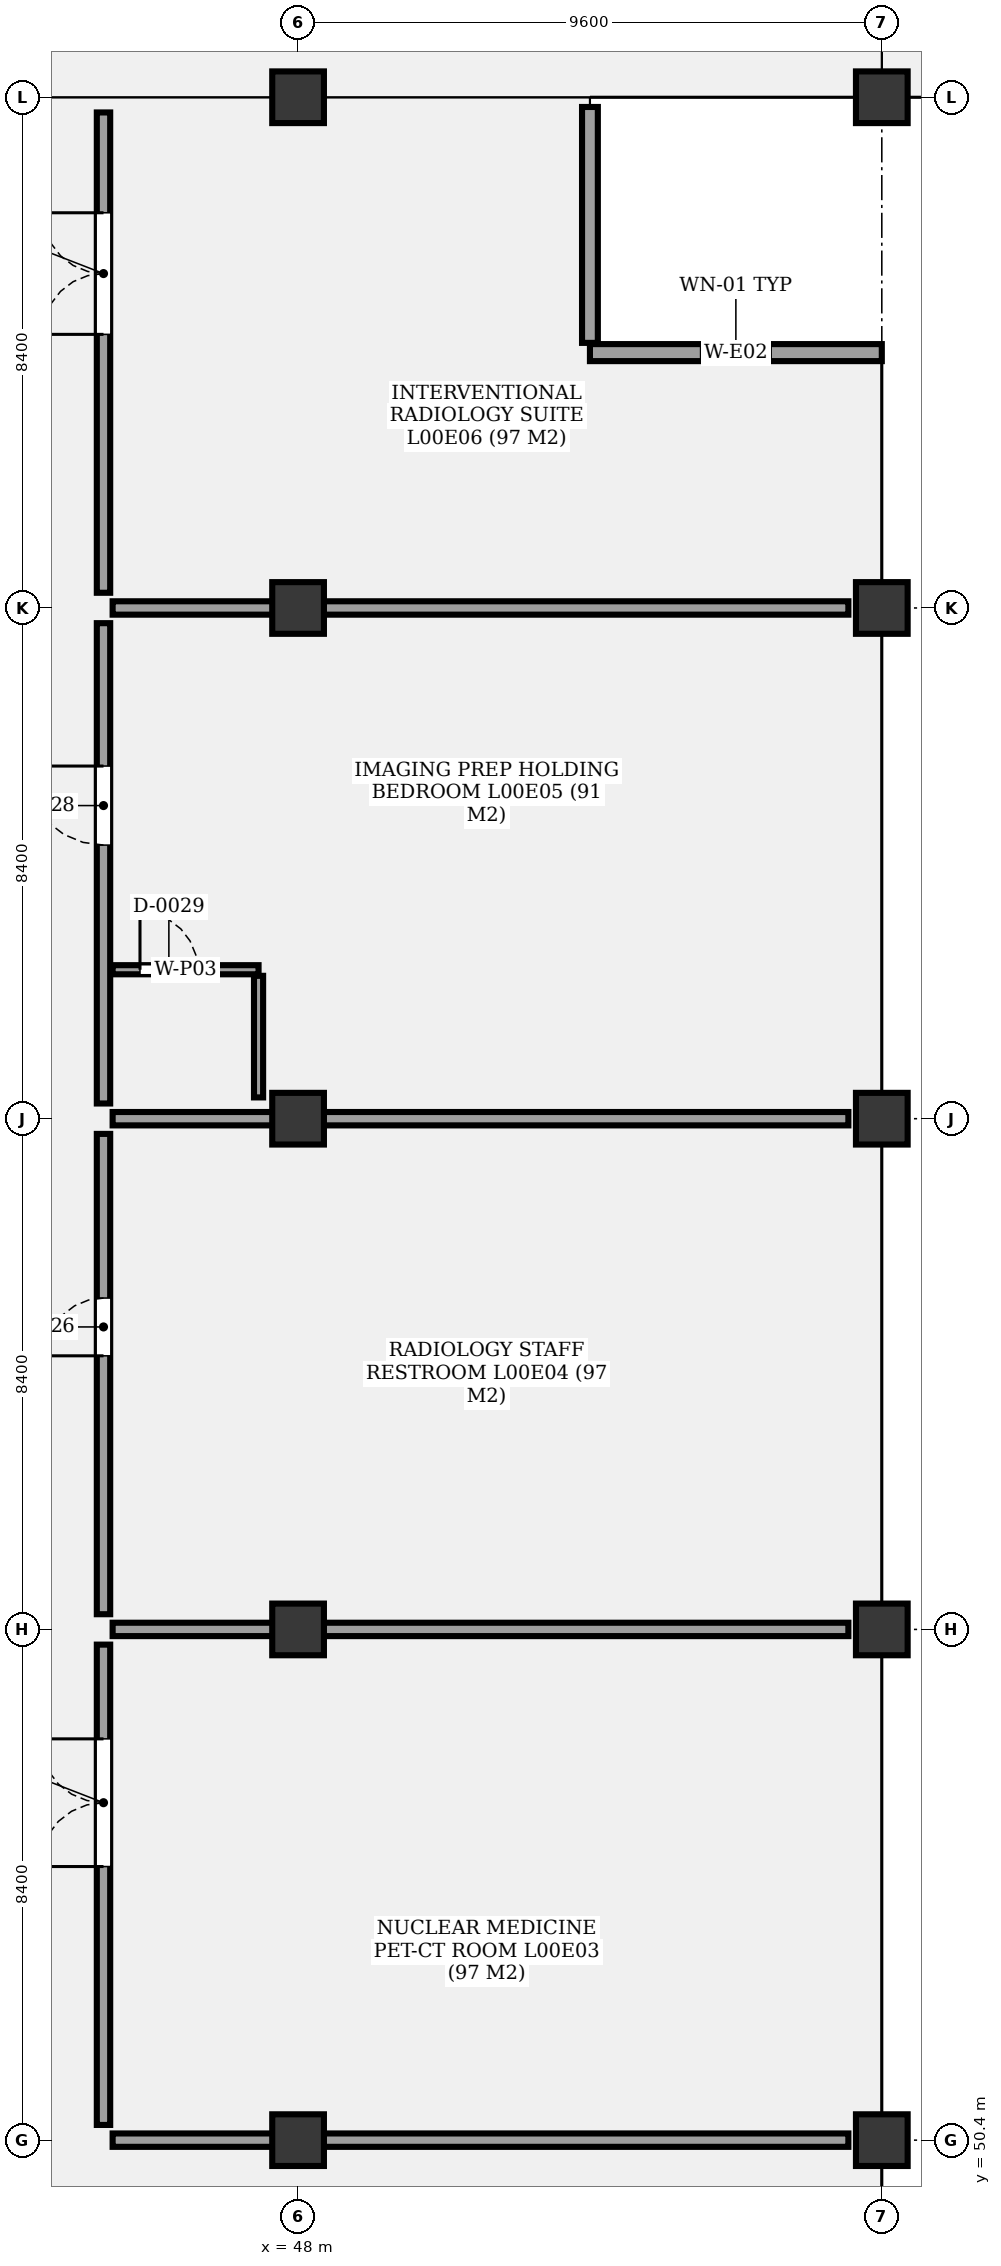
"""IFC4 building model, lengths in metres.
Left out: names, types, materials, properties, quantities, classifications, styles, units other than length and angle.
Written with IfcOpenShell. Run it as: python <this file> out.ifc"""

import sys

from ifc_helpers import new_model, si_unit, direction, frame, frame_2d, origin, origin_2d, place, context, subcontext, project, spatial, rectangle, extrude, element, fill, save


model = new_model("IFC4")
c1 = context("Model", 3, precision=1e-05, world=origin(), true_north=direction((0.0, 1.0)))
c2 = subcontext(c1, "Body", "Model", "MODEL_VIEW")
j1 = project(units=[si_unit("LENGTHUNIT", "METRE"), si_unit("PLANEANGLEUNIT", "RADIAN")], contexts=[c1])
p1 = place(None, origin())
s1 = spatial("IfcSite", under=j1, at=p1, CompositionType="ELEMENT")
p2 = place(p1, origin())
s2 = spatial("IfcBuilding", under=s1, at=p2, CompositionType="ELEMENT")
p3 = place(p2, origin())
s3 = spatial("IfcBuildingStorey", under=s2, at=p3, CompositionType="ELEMENT", Elevation=0.0)
for number, where, z_axis, x_axis in (
    (1, (48.0, 50.4, -0.35), (0.0, 0.0, 1.0), (1.0, 0.0, 0.0)),
    (2, (48.0, 58.8, -0.35), (0.0, 0.0, 1.0), (1.0, 0.0, 0.0)),
    (3, (48.0, 67.2, -0.35), (0.0, 0.0, 1.0), (1.0, 0.0, 0.0)),
    (4, (48.0, 75.6, -0.35), (0.0, 0.0, 1.0), (1.0, 0.0, 0.0)),
    (5, (48.0, 84.0, -0.35), (0.0, 0.0, 1.0), (1.0, 0.0, 0.0)),
    (6, (57.6, 50.4, -0.35), (0.0, 0.0, 1.0), (1.0, 0.0, 0.0)),
    (7, (57.6, 58.8, -0.35), (0.0, 0.0, 1.0), (1.0, 0.0, 0.0)),
    (8, (57.6, 67.2, -0.35), (0.0, 0.0, 1.0), (1.0, 0.0, 0.0)),
    (9, (57.6, 75.6, -0.35), (0.0, 0.0, 1.0), (1.0, 0.0, 0.0)),
    (10, (57.6, 84.0, -0.35), (0.0, 0.0, 1.0), (1.0, 0.0, 0.0)),
):
    element("IfcColumn", number, at=place(p3, frame(where, z_axis=z_axis, x_axis=x_axis)), inside=s3, PredefinedType="COLUMN", context=c2, shape_type="SweptSolid", body=[
        extrude(rectangle(XDim=0.85, YDim=0.85, at=origin_2d()), origin(), (0.0, 0.0, 1.0), 5.45),
    ])
p4 = place(p3, frame((52.8, 79.8, 0.0), z_axis=(0.0, 0.0, 1.0), x_axis=(1.0, 0.0, 0.0)))
e11 = element("IfcWall", 11, at=p4, inside=s3, PredefinedType="SOLIDWALL", context=c2, shape_type="SweptSolid", body=[
    extrude(rectangle(XDim=4.8, YDim=0.28, at=frame_2d((2.4, 0.0))), origin(), (0.0, 0.0, 1.0), 4.24),
])
p5 = place(p4, frame((1.825, 0.0, 0.85)))
e12 = element("IfcOpeningElement", 12, at=p5, cuts=e11, PredefinedType="OPENING", context=c2, shape_type="SweptSolid", body=[
    extrude(rectangle(XDim=1.15, YDim=1.2, at=frame_2d((0.575, 0.6))), frame((0.0, 0.15, 0.0), z_axis=(0.0, -1.0, 0.0), x_axis=(1.0, 0.0, 0.0)), (0.0, 0.0, 1.0), 0.3),
])
p6 = place(p3, frame((52.8, 83.84, 0.0), z_axis=(0.0, 0.0, 1.0), x_axis=(0.0, -1.0, 0.0)))
e13 = element("IfcWall", 13, at=p6, inside=s3, PredefinedType="SOLIDWALL", context=c2, shape_type="SweptSolid", body=[
    extrude(rectangle(XDim=3.88, YDim=0.26, at=frame_2d((1.94, 0.0))), origin(), (0.0, 0.0, 1.0), 4.24),
])
p7 = place(p3, frame((44.8, 50.65, 0.0), z_axis=(0.0, 0.0, 1.0), x_axis=(0.0, 1.0, 0.0)))
e14 = element("IfcWall", 14, at=p7, inside=s3, PredefinedType="PARTITIONING", context=c2, shape_type="SweptSolid", body=[
    extrude(rectangle(XDim=7.9, YDim=0.22, at=frame_2d((3.95, 0.0))), origin(), (0.0, 0.0, 1.0), 3.98),
])
p8 = place(p7, frame((4.25, 0.0, 0.0)))
e15 = element("IfcOpeningElement", 15, at=p8, cuts=e14, PredefinedType="OPENING", context=c2, shape_type="SweptSolid", body=[
    extrude(rectangle(XDim=2.1, YDim=2.4, at=frame_2d((1.05, 1.2))), frame((0.0, 0.12, 0.0), z_axis=(0.0, -1.0, 0.0), x_axis=(1.0, 0.0, 0.0)), (0.0, 0.0, 1.0), 0.24),
])
p9 = place(p3, frame((44.95, 50.4, 0.0), z_axis=(0.0, 0.0, 1.0), x_axis=(1.0, 0.0, 0.0)))
e16 = element("IfcWall", 16, at=p9, inside=s3, PredefinedType="PARTITIONING", context=c2, shape_type="SweptSolid", body=[
    extrude(rectangle(XDim=12.1, YDim=0.22, at=frame_2d((6.05, 0.0))), origin(), (0.0, 0.0, 1.0), 3.98),
])
p10 = place(p3, frame((44.8, 59.05, 0.0), z_axis=(0.0, 0.0, 1.0), x_axis=(0.0, 1.0, 0.0)))
e17 = element("IfcWall", 17, at=p10, inside=s3, PredefinedType="PARTITIONING", context=c2, shape_type="SweptSolid", body=[
    extrude(rectangle(XDim=7.9, YDim=0.22, at=frame_2d((3.95, 0.0))), origin(), (0.0, 0.0, 1.0), 3.98),
])
p11 = place(p10, frame((4.25, 0.0, 0.0)))
e18 = element("IfcOpeningElement", 18, at=p11, cuts=e17, PredefinedType="OPENING", context=c2, shape_type="SweptSolid", body=[
    extrude(rectangle(XDim=0.95, YDim=2.1, at=frame_2d((0.475, 1.05))), frame((0.0, 0.12, 0.0), z_axis=(0.0, -1.0, 0.0), x_axis=(1.0, 0.0, 0.0)), (0.0, 0.0, 1.0), 0.24),
])
p12 = place(p3, frame((44.95, 58.8, 0.0), z_axis=(0.0, 0.0, 1.0), x_axis=(1.0, 0.0, 0.0)))
e19 = element("IfcWall", 19, at=p12, inside=s3, PredefinedType="PARTITIONING", context=c2, shape_type="SweptSolid", body=[
    extrude(rectangle(XDim=12.1, YDim=0.22, at=frame_2d((6.05, 0.0))), origin(), (0.0, 0.0, 1.0), 3.98),
])
p13 = place(p3, frame((44.8, 67.45, 0.0), z_axis=(0.0, 0.0, 1.0), x_axis=(0.0, 1.0, 0.0)))
e20 = element("IfcWall", 20, at=p13, inside=s3, PredefinedType="PARTITIONING", context=c2, shape_type="SweptSolid", body=[
    extrude(rectangle(XDim=7.9, YDim=0.22, at=frame_2d((3.95, 0.0))), origin(), (0.0, 0.0, 1.0), 3.98),
])
p14 = place(p13, frame((4.25, 0.0, 0.0)))
e21 = element("IfcOpeningElement", 21, at=p14, cuts=e20, PredefinedType="OPENING", context=c2, shape_type="SweptSolid", body=[
    extrude(rectangle(XDim=1.3, YDim=2.2, at=frame_2d((0.65, 1.1))), frame((0.0, 0.12, 0.0), z_axis=(0.0, -1.0, 0.0), x_axis=(1.0, 0.0, 0.0)), (0.0, 0.0, 1.0), 0.24),
])
p15 = place(p3, frame((44.95, 69.65, 0.0), z_axis=(0.0, 0.0, 1.0), x_axis=(1.0, 0.0, 0.0)))
e22 = element("IfcWall", 22, at=p15, inside=s3, PredefinedType="PARTITIONING", context=c2, shape_type="SweptSolid", body=[
    extrude(rectangle(XDim=2.4, YDim=0.15, at=frame_2d((1.2, 0.0))), origin(), (0.0, 0.0, 1.0), 3.98),
])
p16 = place(p15, frame((0.45, 0.0, 0.0)))
e23 = element("IfcOpeningElement", 23, at=p16, cuts=e22, PredefinedType="OPENING", context=c2, shape_type="SweptSolid", body=[
    extrude(rectangle(XDim=0.95, YDim=2.1, at=frame_2d((0.475, 1.05))), frame((0.0, 0.085, 0.0), z_axis=(0.0, -1.0, 0.0), x_axis=(1.0, 0.0, 0.0)), (0.0, 0.0, 1.0), 0.17),
])
p17 = place(p3, frame((47.35, 67.55, 0.0), z_axis=(0.0, 0.0, 1.0), x_axis=(0.0, 1.0, 0.0)))
e24 = element("IfcWall", 24, at=p17, inside=s3, PredefinedType="PARTITIONING", context=c2, shape_type="SweptSolid", body=[
    extrude(rectangle(XDim=2.0, YDim=0.15, at=frame_2d((1.0, 0.0))), origin(), (0.0, 0.0, 1.0), 3.98),
])
p18 = place(p3, frame((44.95, 67.2, 0.0), z_axis=(0.0, 0.0, 1.0), x_axis=(1.0, 0.0, 0.0)))
e25 = element("IfcWall", 25, at=p18, inside=s3, PredefinedType="PARTITIONING", context=c2, shape_type="SweptSolid", body=[
    extrude(rectangle(XDim=12.1, YDim=0.22, at=frame_2d((6.05, 0.0))), origin(), (0.0, 0.0, 1.0), 3.98),
])
p19 = place(p3, frame((44.8, 75.85, 0.0), z_axis=(0.0, 0.0, 1.0), x_axis=(0.0, 1.0, 0.0)))
e26 = element("IfcWall", 26, at=p19, inside=s3, PredefinedType="PARTITIONING", context=c2, shape_type="SweptSolid", body=[
    extrude(rectangle(XDim=7.9, YDim=0.22, at=frame_2d((3.95, 0.0))), origin(), (0.0, 0.0, 1.0), 3.98),
])
p20 = place(p19, frame((4.25, 0.0, 0.0)))
e27 = element("IfcOpeningElement", 27, at=p20, cuts=e26, PredefinedType="OPENING", context=c2, shape_type="SweptSolid", body=[
    extrude(rectangle(XDim=2.0, YDim=2.4, at=frame_2d((1.0, 1.2))), frame((0.0, 0.12, 0.0), z_axis=(0.0, -1.0, 0.0), x_axis=(1.0, 0.0, 0.0)), (0.0, 0.0, 1.0), 0.24),
])
p21 = place(p3, frame((44.95, 75.6, 0.0), z_axis=(0.0, 0.0, 1.0), x_axis=(1.0, 0.0, 0.0)))
e28 = element("IfcWall", 28, at=p21, inside=s3, PredefinedType="PARTITIONING", context=c2, shape_type="SweptSolid", body=[
    extrude(rectangle(XDim=12.1, YDim=0.22, at=frame_2d((6.05, 0.0))), origin(), (0.0, 0.0, 1.0), 3.98),
])
p22 = place(p5, origin())
e29 = element("IfcWindow", 29, at=p22, inside=s3, PartitioningType="SINGLE_PANEL", PredefinedType="WINDOW", context=c2, shape_type="SweptSolid", body=[
    extrude(rectangle(XDim=1.15, YDim=1.2, at=frame_2d((0.575, 0.6))), frame((0.0, 0.03, 0.0), z_axis=(0.0, -1.0, 0.0), x_axis=(1.0, 0.0, 0.0)), (0.0, 0.0, 1.0), 0.06),
])
fill(e12, e29)
p23 = place(p8, origin())
e30 = element("IfcDoor", 30, at=p23, inside=s3, OperationType="DOUBLE_DOOR_SINGLE_SWING", PredefinedType="DOOR", context=c2, shape_type="SweptSolid", body=[
    extrude(rectangle(XDim=2.1, YDim=2.4, at=frame_2d((1.05, 1.2))), frame((0.0, 0.025, 0.0), z_axis=(0.0, -1.0, 0.0), x_axis=(1.0, 0.0, 0.0)), (0.0, 0.0, 1.0), 0.05),
])
fill(e15, e30)
p24 = place(p11, origin())
e31 = element("IfcDoor", 31, at=p24, inside=s3, OperationType="SINGLE_SWING_LEFT", PredefinedType="DOOR", context=c2, shape_type="SweptSolid", body=[
    extrude(rectangle(XDim=0.95, YDim=2.1, at=frame_2d((0.475, 1.05))), frame((0.0, 0.025, 0.0), z_axis=(0.0, -1.0, 0.0), x_axis=(1.0, 0.0, 0.0)), (0.0, 0.0, 1.0), 0.05),
])
fill(e18, e31)
p25 = place(p14, origin())
e32 = element("IfcDoor", 32, at=p25, inside=s3, OperationType="SINGLE_SWING_RIGHT", PredefinedType="DOOR", context=c2, shape_type="SweptSolid", body=[
    extrude(rectangle(XDim=1.3, YDim=2.2, at=frame_2d((0.65, 1.1))), frame((0.0, 0.025, 0.0), z_axis=(0.0, -1.0, 0.0), x_axis=(1.0, 0.0, 0.0)), (0.0, 0.0, 1.0), 0.05),
])
fill(e21, e32)
p26 = place(p16, origin())
e33 = element("IfcDoor", 33, at=p26, inside=s3, OperationType="SINGLE_SWING_LEFT", PredefinedType="DOOR", context=c2, shape_type="SweptSolid", body=[
    extrude(rectangle(XDim=0.95, YDim=2.1, at=frame_2d((0.475, 1.05))), frame((0.0, 0.025, 0.0), z_axis=(0.0, -1.0, 0.0), x_axis=(1.0, 0.0, 0.0)), (0.0, 0.0, 1.0), 0.05),
])
fill(e23, e33)
p27 = place(p20, origin())
e34 = element("IfcDoor", 34, at=p27, inside=s3, OperationType="DOUBLE_DOOR_SINGLE_SWING", PredefinedType="DOOR", context=c2, shape_type="SweptSolid", body=[
    extrude(rectangle(XDim=2.0, YDim=2.4, at=frame_2d((1.0, 1.2))), frame((0.0, 0.025, 0.0), z_axis=(0.0, -1.0, 0.0), x_axis=(1.0, 0.0, 0.0)), (0.0, 0.0, 1.0), 0.05),
])
fill(e27, e34)
save(model, sys.argv[1])
